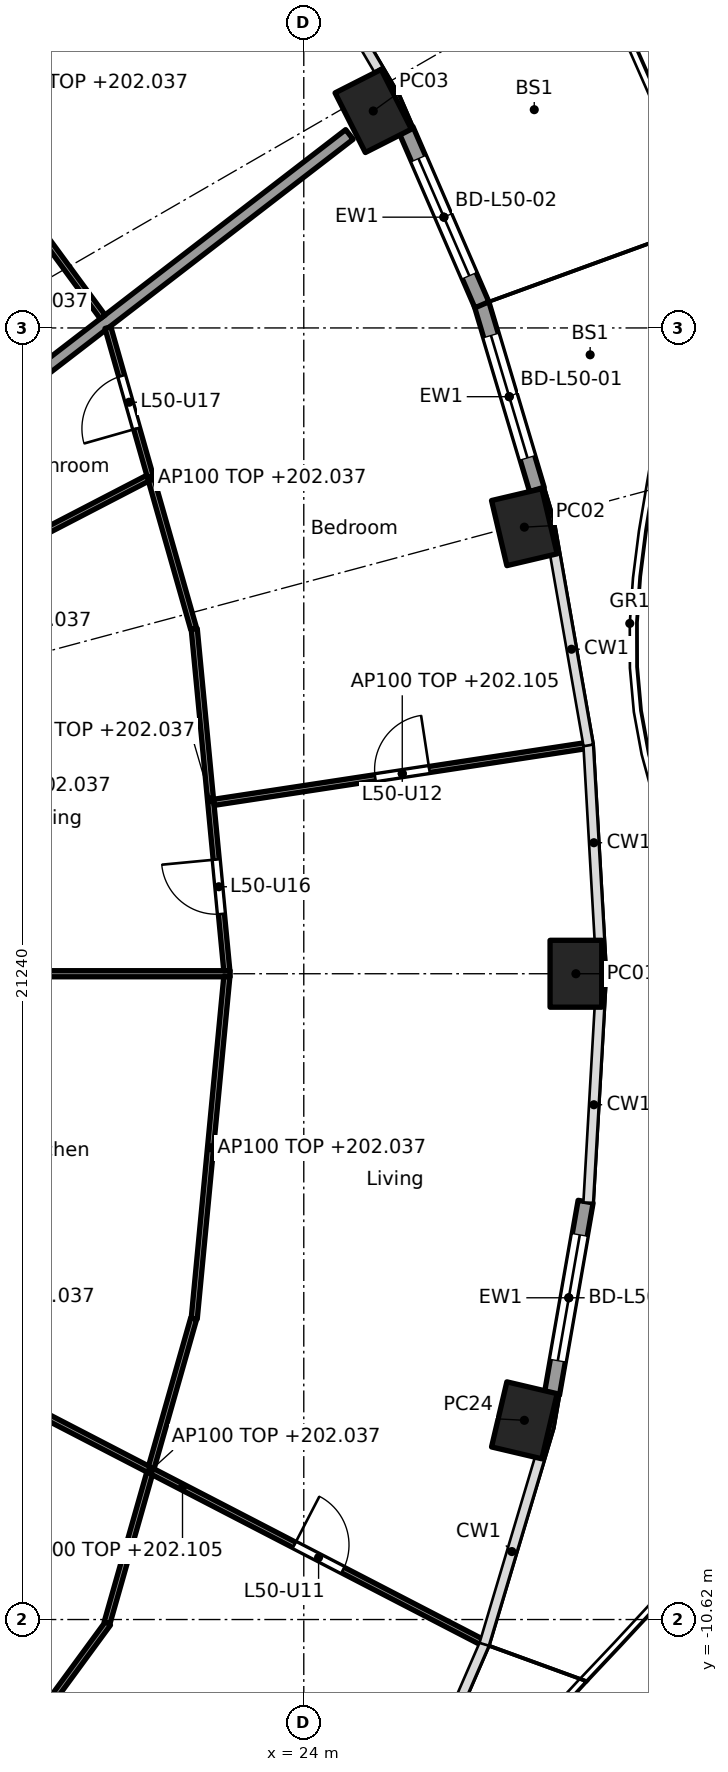
"""IFC4 building model, lengths in metres.
Left out: names, types, materials, properties, quantities, classifications, styles, units other than length and angle.
Written with IfcOpenShell. Run it as: python <this file> out.ifc"""

import sys

from ifc_helpers import new_model, si_unit, direction, frame, frame_2d, origin, origin_2d, place, context, subcontext, project, spatial, rectangle, hollow_rectangle, extrude, element, fill, save


model = new_model("IFC4")
c1 = context("Model", 3, precision=1e-05, world=origin(), true_north=direction((0.0, 1.0)))
c2 = subcontext(c1, "Body", "Model", "MODEL_VIEW")
j1 = project(units=[si_unit("LENGTHUNIT", "METRE"), si_unit("PLANEANGLEUNIT", "RADIAN")], contexts=[c1])
p1 = place(None, origin())
s1 = spatial("IfcSite", under=j1, at=p1, CompositionType="ELEMENT")
p2 = place(p1, origin())
s2 = spatial("IfcBuilding", under=s1, at=p2, CompositionType="ELEMENT")
p3 = place(p2, frame((0.0, 0.0, 199.2)))
s3 = spatial("IfcBuildingStorey", under=s2, at=p3, CompositionType="ELEMENT", Elevation=199.2)
for number, where, z_axis, x_axis in (
    (1, (28.475, 0.0, 0.0), (0.0, 0.0, 1.0), (0.0, 1.0, 0.0)),
    (2, (27.627, 7.344, 0.0), (0.0, 0.0, 1.0), (-0.229, 0.973, 0.0)),
    (3, (25.142, 14.188, 0.0), (0.0, 0.0, 1.0), (-0.452, 0.892, 0.0)),
    (4, (27.627, -7.344, 0.0), (0.0, 0.0, 1.0), (0.229, 0.973, 0.0)),
):
    element("IfcColumn", number, at=place(p3, frame(where, z_axis=z_axis, x_axis=x_axis)), inside=s3, PredefinedType="COLUMN", context=c2, shape_type="SweptSolid", body=[
        extrude(hollow_rectangle(XDim=1.1, YDim=0.85, WallThickness=0.036, at=origin_2d()), origin(), (0.0, 0.0, 1.0), 3.7),
    ])
p4 = place(p3, frame((26.924, 11.014, 0.0), z_axis=(0.0, 0.0, 1.0), x_axis=(0.28584838049, -0.958274857946, 0.0)))
e5 = element("IfcWall", 5, at=p4, inside=s3, PredefinedType="SOLIDWALL", context=c2, shape_type="SweptSolid", body=[
    extrude(rectangle(XDim=3.182, YDim=0.25, at=frame_2d((1.591, 0.0))), origin(), (0.0, 0.0, 1.0), 3.44),
])
p5 = place(p4, frame((0.541, 0.0, 0.0)))
e6 = element("IfcOpeningElement", 6, at=p5, cuts=e5, PredefinedType="OPENING", context=c2, shape_type="SweptSolid", body=[
    extrude(rectangle(XDim=2.1, YDim=2.4, at=frame_2d((1.05, 1.2))), frame((0.0, 0.135, 0.0), z_axis=(0.0, -1.0, 0.0), x_axis=(1.0, 0.0, 0.0)), (0.0, 0.0, 1.0), 0.27),
])
p6 = place(p3, frame((25.679, 13.883, 0.0), z_axis=(0.0, 0.0, 1.0), x_axis=(0.397620521824, -0.917549955384, 0.0)))
e7 = element("IfcWall", 7, at=p6, inside=s3, PredefinedType="SOLIDWALL", context=c2, shape_type="SweptSolid", body=[
    extrude(rectangle(XDim=3.142, YDim=0.25, at=frame_2d((1.571, 0.0))), origin(), (0.0, 0.0, 1.0), 3.44),
])
p7 = place(p6, frame((0.521, 0.0, 0.0)))
e8 = element("IfcOpeningElement", 8, at=p7, cuts=e7, PredefinedType="OPENING", context=c2, shape_type="SweptSolid", body=[
    extrude(rectangle(XDim=2.1, YDim=2.4, at=frame_2d((1.05, 1.2))), frame((0.0, 0.135, 0.0), z_axis=(0.0, -1.0, 0.0), x_axis=(1.0, 0.0, 0.0)), (0.0, 0.0, 1.0), 0.27),
])
p8 = place(p3, frame((28.635, -3.747, 0.0), z_axis=(0.0, 0.0, 1.0), x_axis=(-0.172149769468, -0.985070787747, 0.0)))
e9 = element("IfcWall", 9, at=p8, inside=s3, PredefinedType="SOLIDWALL", context=c2, shape_type="SweptSolid", body=[
    extrude(rectangle(XDim=3.211, YDim=0.25, at=frame_2d((1.605, 0.0))), origin(), (0.0, 0.0, 1.0), 3.44),
])
p9 = place(p8, frame((0.555, 0.0, 0.0)))
e10 = element("IfcOpeningElement", 10, at=p9, cuts=e9, PredefinedType="OPENING", context=c2, shape_type="SweptSolid", body=[
    extrude(rectangle(XDim=2.1, YDim=2.4, at=frame_2d((1.05, 1.2))), frame((0.0, 0.135, 0.0), z_axis=(0.0, -1.0, 0.0), x_axis=(1.0, 0.0, 0.0)), (0.0, 0.0, 1.0), 0.27),
])
p10 = place(p3, frame((14.822, 6.154, 0.0), z_axis=(0.0, 0.0, 1.0), x_axis=(0.792203056092, 0.610257583254, 0.0)))
e11 = element("IfcWall", 11, at=p10, inside=s3, PredefinedType="PARTITIONING", context=c2, shape_type="SweptSolid", body=[
    extrude(rectangle(XDim=12.533, YDim=0.2, at=frame_2d((6.266, 0.0))), origin(), (0.0, 0.0, 1.0), 2.837),
])
p11 = place(p3, frame((12.665, 0.0, 0.0), z_axis=(0.0, 0.0, 1.0), x_axis=(1.0, 0.0, 0.0)))
e12 = element("IfcWall", 12, at=p11, inside=s3, PredefinedType="PARTITIONING", context=c2, shape_type="SweptSolid", body=[
    extrude(rectangle(XDim=10.124, YDim=0.1, at=frame_2d((5.062, 0.0))), origin(), (0.0, 0.0, 1.0), 2.756),
])
p12 = place(p3, frame((22.734, 0.05, 0.0), z_axis=(0.0, 0.0, 1.0), x_axis=(-0.0949274088, 0.995484197292, 0.0)))
e13 = element("IfcWall", 13, at=p12, inside=s3, PredefinedType="PARTITIONING", context=c2, shape_type="SweptSolid", body=[
    extrude(rectangle(XDim=5.648, YDim=0.1, at=frame_2d((2.824, 0.0))), origin(), (0.0, 0.0, 1.0), 2.837),
])
p13 = place(p12, frame((0.937, 0.0, 0.0)))
e14 = element("IfcOpeningElement", 14, at=p13, cuts=e13, PredefinedType="OPENING", context=c2, shape_type="SweptSolid", body=[
    extrude(rectangle(XDim=0.9, YDim=2.1, at=frame_2d((0.45, 1.05))), frame((0.0, 0.06, 0.0), z_axis=(0.0, -1.0, 0.0), x_axis=(1.0, 0.0, 0.0)), (0.0, 0.0, 1.0), 0.12),
])
p14 = place(p3, frame((22.734, -0.05, 0.0), z_axis=(0.0, 0.0, 1.0), x_axis=(-0.0949274088, -0.995484197292, 0.0)))
e15 = element("IfcWall", 15, at=p14, inside=s3, PredefinedType="PARTITIONING", context=c2, shape_type="SweptSolid", body=[
    extrude(rectangle(XDim=5.648, YDim=0.1, at=frame_2d((2.824, 0.0))), origin(), (0.0, 0.0, 1.0), 2.837),
])
p15 = place(p3, frame((22.521, 2.819, 0.0), z_axis=(0.0, 0.0, 1.0), x_axis=(0.988590363863, 0.150628989499, 0.0)))
e16 = element("IfcWall", 16, at=p15, inside=s3, PredefinedType="PARTITIONING", context=c2, shape_type="SweptSolid", body=[
    extrude(rectangle(XDim=6.269, YDim=0.1, at=frame_2d((3.135, 0.0))), origin(), (0.0, 0.0, 1.0), 2.905),
])
p16 = place(p15, frame((2.685, 0.0, 0.0)))
e17 = element("IfcOpeningElement", 17, at=p16, cuts=e16, PredefinedType="OPENING", context=c2, shape_type="SweptSolid", body=[
    extrude(rectangle(XDim=0.9, YDim=2.1, at=frame_2d((0.45, 1.05))), frame((0.0, 0.06, 0.0), z_axis=(0.0, -1.0, 0.0), x_axis=(1.0, 0.0, 0.0)), (0.0, 0.0, 1.0), 0.12),
])
p17 = place(p3, frame((22.189, 5.67, 0.0), z_axis=(0.0, 0.0, 1.0), x_axis=(-0.273819702124, 0.961781040949, 0.0)))
e18 = element("IfcWall", 18, at=p17, inside=s3, PredefinedType="PARTITIONING", context=c2, shape_type="SweptSolid", body=[
    extrude(rectangle(XDim=5.152, YDim=0.1, at=frame_2d((2.576, 0.0))), origin(), (0.0, 0.0, 1.0), 2.837),
])
p18 = place(p17, frame((3.426, 0.0, 0.0)))
e19 = element("IfcOpeningElement", 19, at=p18, cuts=e18, PredefinedType="OPENING", context=c2, shape_type="SweptSolid", body=[
    extrude(rectangle(XDim=0.9, YDim=2.1, at=frame_2d((0.45, 1.05))), frame((0.0, 0.06, 0.0), z_axis=(0.0, -1.0, 0.0), x_axis=(1.0, 0.0, 0.0)), (0.0, 0.0, 1.0), 0.12),
])
p19 = place(p3, frame((17.003, 5.851, 0.0), z_axis=(0.0, 0.0, 1.0), x_axis=(0.887654549419, 0.460509935719, 0.0)))
e20 = element("IfcWall", 20, at=p19, inside=s3, PredefinedType="PARTITIONING", context=c2, shape_type="SweptSolid", body=[
    extrude(rectangle(XDim=4.99, YDim=0.1, at=frame_2d((2.495, 0.0))), origin(), (0.0, 0.0, 1.0), 3.44),
])
p20 = place(p3, frame((20.692, 10.802, 0.0), z_axis=(0.0, 0.0, 1.0), x_axis=(-0.591122127251, 0.806582066918, 0.0)))
e21 = element("IfcWall", 21, at=p20, inside=s3, PredefinedType="PARTITIONING", context=c2, shape_type="SweptSolid", body=[
    extrude(rectangle(XDim=5.96, YDim=0.1, at=frame_2d((2.98, 0.0))), origin(), (0.0, 0.0, 1.0), 2.837),
])
p21 = place(p20, frame((2.505, 0.0, 0.0)))
e22 = element("IfcOpeningElement", 22, at=p21, cuts=e21, PredefinedType="OPENING", context=c2, shape_type="SweptSolid", body=[
    extrude(rectangle(XDim=0.9, YDim=2.1, at=frame_2d((0.45, 1.05))), frame((0.0, 0.06, 0.0), z_axis=(0.0, -1.0, 0.0), x_axis=(1.0, 0.0, 0.0)), (0.0, 0.0, 1.0), 0.12),
])
p22 = place(p3, frame((17.229, -15.529, 0.0), z_axis=(0.0, 0.0, 1.0), x_axis=(0.591117075283, 0.806585769345, 0.0)))
e23 = element("IfcWall", 23, at=p22, inside=s3, PredefinedType="PARTITIONING", context=c2, shape_type="SweptSolid", body=[
    extrude(rectangle(XDim=6.01, YDim=0.1, at=frame_2d((3.005, 0.0))), origin(), (0.0, 0.0, 1.0), 2.837),
])
p23 = place(p3, frame((20.765, -10.673, 0.0), z_axis=(0.0, 0.0, 1.0), x_axis=(0.273815967041, 0.961782104322, 0.0)))
e24 = element("IfcWall", 24, at=p23, inside=s3, PredefinedType="PARTITIONING", context=c2, shape_type="SweptSolid", body=[
    extrude(rectangle(XDim=5.202, YDim=0.1, at=frame_2d((2.601, 0.0))), origin(), (0.0, 0.0, 1.0), 2.837),
])
p24 = place(p3, frame((17.003, -5.851, 0.0), z_axis=(0.0, 0.0, 1.0), x_axis=(0.888005628038, -0.4598325832, 0.0)))
e25 = element("IfcWall", 25, at=p24, inside=s3, PredefinedType="PARTITIONING", context=c2, shape_type="SweptSolid", body=[
    extrude(rectangle(XDim=11.266, YDim=0.1, at=frame_2d((5.633, 0.0))), origin(), (0.0, 0.0, 1.0), 2.905),
])
p25 = place(p24, frame((7.703, 0.0, 0.0)))
e26 = element("IfcOpeningElement", 26, at=p25, cuts=e25, PredefinedType="OPENING", context=c2, shape_type="SweptSolid", body=[
    extrude(rectangle(XDim=0.9, YDim=2.1, at=frame_2d((0.45, 1.05))), frame((0.0, 0.06, 0.0), z_axis=(0.0, -1.0, 0.0), x_axis=(1.0, 0.0, 0.0)), (0.0, 0.0, 1.0), 0.12),
])
p26 = place(p24, frame((2.07, 0.0, 0.0)))
e27 = element("IfcOpeningElement", 27, at=p26, cuts=e25, PredefinedType="OPENING", context=c2, shape_type="SweptSolid", body=[
    extrude(rectangle(XDim=0.9, YDim=2.1, at=frame_2d((0.45, 1.05))), frame((0.0, 0.06, 0.0), z_axis=(0.0, -1.0, 0.0), x_axis=(1.0, 0.0, 0.0)), (0.0, 0.0, 1.0), 0.12),
])
p27 = place(p5, origin())
e28 = element("IfcDoor", 28, at=p27, inside=s3, OperationType="SLIDING_TO_LEFT", PredefinedType="DOOR", context=c2, shape_type="SweptSolid", body=[
    extrude(rectangle(XDim=2.1, YDim=2.4, at=frame_2d((1.05, 1.2))), frame((0.0, 0.025, 0.0), z_axis=(0.0, -1.0, 0.0), x_axis=(1.0, 0.0, 0.0)), (0.0, 0.0, 1.0), 0.05),
])
fill(e6, e28)
p28 = place(p7, origin())
e29 = element("IfcDoor", 29, at=p28, inside=s3, OperationType="SLIDING_TO_LEFT", PredefinedType="DOOR", context=c2, shape_type="SweptSolid", body=[
    extrude(rectangle(XDim=2.1, YDim=2.4, at=frame_2d((1.05, 1.2))), frame((0.0, 0.025, 0.0), z_axis=(0.0, -1.0, 0.0), x_axis=(1.0, 0.0, 0.0)), (0.0, 0.0, 1.0), 0.05),
])
fill(e8, e29)
p29 = place(p9, origin())
e30 = element("IfcDoor", 30, at=p29, inside=s3, OperationType="SLIDING_TO_LEFT", PredefinedType="DOOR", context=c2, shape_type="SweptSolid", body=[
    extrude(rectangle(XDim=2.1, YDim=2.4, at=frame_2d((1.05, 1.2))), frame((0.0, 0.025, 0.0), z_axis=(0.0, -1.0, 0.0), x_axis=(1.0, 0.0, 0.0)), (0.0, 0.0, 1.0), 0.05),
])
fill(e10, e30)
p30 = place(p25, origin())
e31 = element("IfcDoor", 31, at=p30, inside=s3, OperationType="SINGLE_SWING_LEFT", PredefinedType="DOOR", context=c2, shape_type="SweptSolid", body=[
    extrude(rectangle(XDim=0.9, YDim=2.1, at=frame_2d((0.45, 1.05))), frame((0.0, 0.025, 0.0), z_axis=(0.0, -1.0, 0.0), x_axis=(1.0, 0.0, 0.0)), (0.0, 0.0, 1.0), 0.05),
])
fill(e26, e31)
p31 = place(p16, origin())
e32 = element("IfcDoor", 32, at=p31, inside=s3, OperationType="SINGLE_SWING_RIGHT", PredefinedType="DOOR", context=c2, shape_type="SweptSolid", body=[
    extrude(rectangle(XDim=0.9, YDim=2.1, at=frame_2d((0.45, 1.05))), frame((0.0, 0.025, 0.0), z_axis=(0.0, -1.0, 0.0), x_axis=(1.0, 0.0, 0.0)), (0.0, 0.0, 1.0), 0.05),
])
fill(e17, e32)
p32 = place(p13, origin())
e33 = element("IfcDoor", 33, at=p32, inside=s3, OperationType="SINGLE_SWING_RIGHT", PredefinedType="DOOR", context=c2, shape_type="SweptSolid", body=[
    extrude(rectangle(XDim=0.9, YDim=2.1, at=frame_2d((0.45, 1.05))), frame((0.0, 0.025, 0.0), z_axis=(0.0, -1.0, 0.0), x_axis=(1.0, 0.0, 0.0)), (0.0, 0.0, 1.0), 0.05),
])
fill(e14, e33)
p33 = place(p18, origin())
e34 = element("IfcDoor", 34, at=p33, inside=s3, OperationType="SINGLE_SWING_LEFT", PredefinedType="DOOR", context=c2, shape_type="SweptSolid", body=[
    extrude(rectangle(XDim=0.9, YDim=2.1, at=frame_2d((0.45, 1.05))), frame((0.0, 0.025, 0.0), z_axis=(0.0, -1.0, 0.0), x_axis=(1.0, 0.0, 0.0)), (0.0, 0.0, 1.0), 0.05),
])
fill(e19, e34)
save(model, sys.argv[1])
